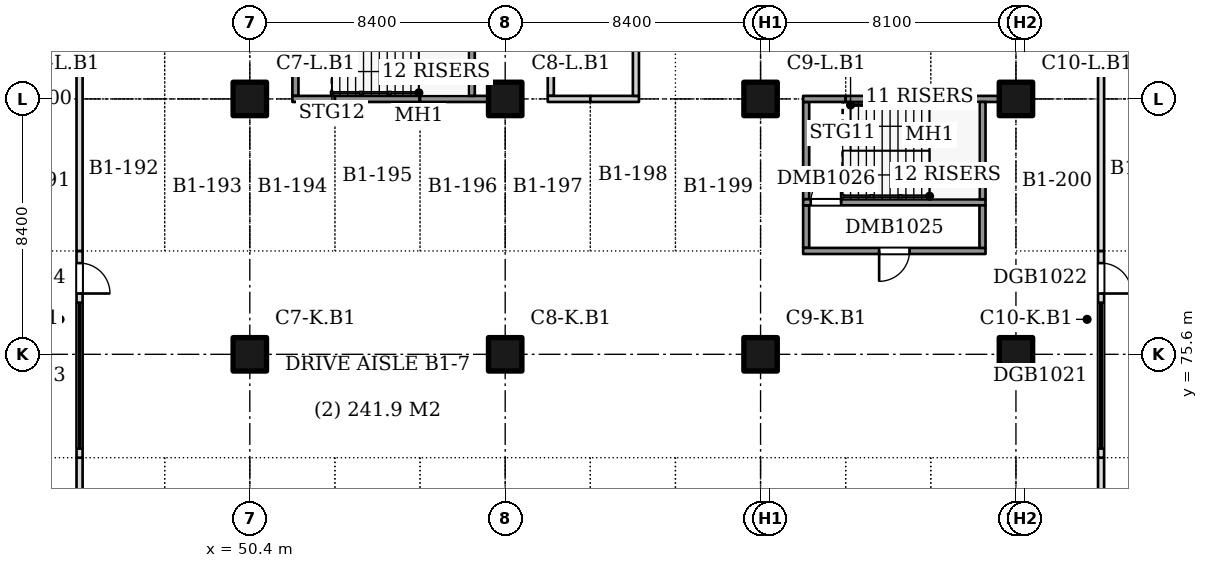
"""IFC4 building model, lengths in metres.
Left out: names, types, materials, properties, quantities, classifications, styles, units other than length and angle.
Written with IfcOpenShell. Run it as: python <this file> out.ifc"""

import sys

from ifc_helpers import new_model, si_unit, direction, frame, frame_2d, origin, origin_2d, place, context, subcontext, project, spatial, rectangle, extrude, element, fill, save


model = new_model("IFC4")
c1 = context("Model", 3, precision=1e-05, world=origin(), true_north=direction((0.0, 1.0)))
c2 = subcontext(c1, "Body", "Model", "MODEL_VIEW")
j1 = project(units=[si_unit("LENGTHUNIT", "METRE"), si_unit("PLANEANGLEUNIT", "RADIAN")], contexts=[c1])
p1 = place(None, origin())
s1 = spatial("IfcSite", under=j1, at=p1, CompositionType="ELEMENT")
p2 = place(p1, origin())
s2 = spatial("IfcBuilding", under=s1, at=p2, CompositionType="ELEMENT")
p3 = place(p2, frame((0.0, 0.0, -4.0)))
s3 = spatial("IfcBuildingStorey", under=s2, at=p3, CompositionType="ELEMENT", Elevation=-4.0)
for number, where, z_axis, x_axis in (
    (1, (50.4, 75.6, 0.0), (0.0, 0.0, 1.0), (1.0, 0.0, 0.0)),
    (2, (50.4, 84.0, 0.0), (0.0, 0.0, 1.0), (1.0, 0.0, 0.0)),
    (3, (58.8, 75.6, 0.0), (0.0, 0.0, 1.0), (1.0, 0.0, 0.0)),
    (4, (58.8, 84.0, 0.0), (0.0, 0.0, 1.0), (1.0, 0.0, 0.0)),
    (5, (67.2, 75.6, 0.0), (0.0, 0.0, 1.0), (1.0, 0.0, 0.0)),
    (6, (67.2, 84.0, 0.0), (0.0, 0.0, 1.0), (1.0, 0.0, 0.0)),
    (7, (75.6, 75.6, 0.0), (0.0, 0.0, 1.0), (1.0, 0.0, 0.0)),
    (8, (75.6, 84.0, 0.0), (0.0, 0.0, 1.0), (1.0, 0.0, 0.0)),
):
    element("IfcColumn", number, at=place(p3, frame(where, z_axis=z_axis, x_axis=x_axis)), inside=s3, PredefinedType="COLUMN", context=c2, shape_type="SweptSolid", body=[
        extrude(rectangle(XDim=1.1, YDim=1.1, at=origin_2d()), origin(), (0.0, 0.0, 1.0), 3.6),
    ])
p4 = place(p3, frame((51.9, 84.1, 0.0), z_axis=(0.0, 0.0, 1.0), x_axis=(0.0, 1.0, 0.0)))
e9 = element("IfcWall", 9, at=p4, inside=s3, PredefinedType="SOLIDWALL", context=c2, shape_type="SweptSolid", body=[
    extrude(rectangle(XDim=3.2, YDim=0.2, at=frame_2d((1.6, 0.0))), origin(), (0.0, 0.0, 1.0), 4.0),
])
p5 = place(p3, frame((51.8, 84.0, 0.0), z_axis=(0.0, 0.0, 1.0), x_axis=(1.0, 0.0, 0.0)))
e10 = element("IfcWall", 10, at=p5, inside=s3, PredefinedType="SOLIDWALL", context=c2, shape_type="SweptSolid", body=[
    extrude(rectangle(XDim=1.4, YDim=0.2, at=frame_2d((0.7, 0.0))), origin(), (0.0, 0.0, 1.0), 4.0),
])
p6 = place(p3, frame((53.2, 84.0, 0.0), z_axis=(0.0, 0.0, 1.0), x_axis=(1.0, 0.0, 0.0)))
e11 = element("IfcWall", 11, at=p6, inside=s3, PredefinedType="SOLIDWALL", context=c2, shape_type="SweptSolid", body=[
    extrude(rectangle(XDim=2.8, YDim=0.2, at=frame_2d((1.4, 0.0))), origin(), (0.0, 0.0, 1.0), 4.0),
])
p7 = place(p3, frame((56.0, 84.0, 0.0), z_axis=(0.0, 0.0, 1.0), x_axis=(1.0, 0.0, 0.0)))
e12 = element("IfcWall", 12, at=p7, inside=s3, PredefinedType="SOLIDWALL", context=c2, shape_type="SweptSolid", body=[
    extrude(rectangle(XDim=2.25, YDim=0.2, at=frame_2d((1.125, 0.0))), origin(), (0.0, 0.0, 1.0), 4.0),
])
p8 = place(p3, frame((57.7, 84.1, 0.0), z_axis=(0.0, 0.0, 1.0), x_axis=(0.0, 1.0, 0.0)))
e13 = element("IfcWall", 13, at=p8, inside=s3, PredefinedType="SOLIDWALL", context=c2, shape_type="SweptSolid", body=[
    extrude(rectangle(XDim=3.2, YDim=0.2, at=frame_2d((1.6, 0.0))), origin(), (0.0, 0.0, 1.0), 4.0),
])
p9 = place(p3, frame((60.3, 84.1, 0.0), z_axis=(0.0, 0.0, 1.0), x_axis=(0.0, 1.0, 0.0)))
e14 = element("IfcWall", 14, at=p9, inside=s3, PredefinedType="PARTITIONING", context=c2, shape_type="SweptSolid", body=[
    extrude(rectangle(XDim=4.8, YDim=0.2, at=frame_2d((2.4, 0.0))), origin(), (0.0, 0.0, 1.0), 3.6),
])
p10 = place(p9, frame((1.9, 0.0, 0.0)))
e15 = element("IfcOpeningElement", 15, at=p10, cuts=e14, PredefinedType="OPENING", context=c2, shape_type="SweptSolid", body=[
    extrude(rectangle(XDim=1.0, YDim=2.1, at=frame_2d((0.5, 1.05))), frame((0.0, 0.11, 0.0), z_axis=(0.0, -1.0, 0.0), x_axis=(1.0, 0.0, 0.0)), (0.0, 0.0, 1.0), 0.22),
])
p11 = place(p3, frame((60.2, 84.0, 0.0), z_axis=(0.0, 0.0, 1.0), x_axis=(1.0, 0.0, 0.0)))
e16 = element("IfcWall", 16, at=p11, inside=s3, PredefinedType="PARTITIONING", context=c2, shape_type="SweptSolid", body=[
    extrude(rectangle(XDim=1.4, YDim=0.2, at=frame_2d((0.7, 0.0))), origin(), (0.0, 0.0, 1.0), 3.6),
])
p12 = place(p3, frame((61.6, 84.0, 0.0), z_axis=(0.0, 0.0, 1.0), x_axis=(1.0, 0.0, 0.0)))
e17 = element("IfcWall", 17, at=p12, inside=s3, PredefinedType="PARTITIONING", context=c2, shape_type="SweptSolid", body=[
    extrude(rectangle(XDim=1.6, YDim=0.2, at=frame_2d((0.8, 0.0))), origin(), (0.0, 0.0, 1.0), 3.6),
])
p13 = place(p3, frame((63.1, 84.1, 0.0), z_axis=(0.0, 0.0, 1.0), x_axis=(0.0, 1.0, 0.0)))
e18 = element("IfcWall", 18, at=p13, inside=s3, PredefinedType="PARTITIONING", context=c2, shape_type="SweptSolid", body=[
    extrude(rectangle(XDim=4.8, YDim=0.2, at=frame_2d((2.4, 0.0))), origin(), (0.0, 0.0, 1.0), 3.6),
])
p14 = place(p3, frame((68.7, 79.1, 0.0), z_axis=(0.0, 0.0, 1.0), x_axis=(0.0, 1.0, 0.0)))
e19 = element("IfcWall", 19, at=p14, inside=s3, PredefinedType="SOLIDWALL", context=c2, shape_type="SweptSolid", body=[
    extrude(rectangle(XDim=1.4, YDim=0.2, at=frame_2d((0.7, 0.0))), origin(), (0.0, 0.0, 1.0), 4.0),
])
p15 = place(p3, frame((68.6, 79.0, 0.0), z_axis=(0.0, 0.0, 1.0), x_axis=(1.0, 0.0, 0.0)))
e20 = element("IfcWall", 20, at=p15, inside=s3, PredefinedType="SOLIDWALL", context=c2, shape_type="SweptSolid", body=[
    extrude(rectangle(XDim=6.0, YDim=0.2, at=frame_2d((3.0, 0.0))), origin(), (0.0, 0.0, 1.0), 4.0),
])
p16 = place(p15, frame((2.5, 0.0, 0.0)))
e21 = element("IfcOpeningElement", 21, at=p16, cuts=e20, PredefinedType="OPENING", context=c2, shape_type="SweptSolid", body=[
    extrude(rectangle(XDim=1.0, YDim=2.1, at=frame_2d((0.5, 1.05))), frame((0.0, 0.11, 0.0), z_axis=(0.0, -1.0, 0.0), x_axis=(1.0, 0.0, 0.0)), (0.0, 0.0, 1.0), 0.22),
])
p17 = place(p3, frame((68.7, 80.7, 0.0), z_axis=(0.0, 0.0, 1.0), x_axis=(0.0, 1.0, 0.0)))
e22 = element("IfcWall", 22, at=p17, inside=s3, PredefinedType="SOLIDWALL", context=c2, shape_type="SweptSolid", body=[
    extrude(rectangle(XDim=3.2, YDim=0.2, at=frame_2d((1.6, 0.0))), origin(), (0.0, 0.0, 1.0), 4.0),
])
p18 = place(p3, frame((68.6, 80.6, 0.0), z_axis=(0.0, 0.0, 1.0), x_axis=(1.0, 0.0, 0.0)))
e23 = element("IfcWall", 23, at=p18, inside=s3, PredefinedType="SOLIDWALL", context=c2, shape_type="SweptSolid", body=[
    extrude(rectangle(XDim=6.0, YDim=0.2, at=frame_2d((3.0, 0.0))), origin(), (0.0, 0.0, 1.0), 4.0),
])
p19 = place(p18, frame((0.25, 0.0, 0.0)))
e24 = element("IfcOpeningElement", 24, at=p19, cuts=e23, PredefinedType="OPENING", context=c2, shape_type="SweptSolid", body=[
    extrude(rectangle(XDim=1.0, YDim=2.1, at=frame_2d((0.5, 1.05))), frame((0.0, 0.11, 0.0), z_axis=(0.0, -1.0, 0.0), x_axis=(1.0, 0.0, 0.0)), (0.0, 0.0, 1.0), 0.22),
])
p20 = place(p3, frame((68.6, 84.0, 0.0), z_axis=(0.0, 0.0, 1.0), x_axis=(1.0, 0.0, 0.0)))
e25 = element("IfcWall", 25, at=p20, inside=s3, PredefinedType="SOLIDWALL", context=c2, shape_type="SweptSolid", body=[
    extrude(rectangle(XDim=1.4, YDim=0.2, at=frame_2d((0.7, 0.0))), origin(), (0.0, 0.0, 1.0), 4.0),
])
p21 = place(p3, frame((70.0, 84.0, 0.0), z_axis=(0.0, 0.0, 1.0), x_axis=(1.0, 0.0, 0.0)))
e26 = element("IfcWall", 26, at=p21, inside=s3, PredefinedType="SOLIDWALL", context=c2, shape_type="SweptSolid", body=[
    extrude(rectangle(XDim=2.8, YDim=0.2, at=frame_2d((1.4, 0.0))), origin(), (0.0, 0.0, 1.0), 4.0),
])
p22 = place(p3, frame((72.8, 84.0, 0.0), z_axis=(0.0, 0.0, 1.0), x_axis=(1.0, 0.0, 0.0)))
e27 = element("IfcWall", 27, at=p22, inside=s3, PredefinedType="SOLIDWALL", context=c2, shape_type="SweptSolid", body=[
    extrude(rectangle(XDim=2.25, YDim=0.2, at=frame_2d((1.125, 0.0))), origin(), (0.0, 0.0, 1.0), 4.0),
])
p23 = place(p3, frame((74.5, 79.1, 0.0), z_axis=(0.0, 0.0, 1.0), x_axis=(0.0, 1.0, 0.0)))
e28 = element("IfcWall", 28, at=p23, inside=s3, PredefinedType="SOLIDWALL", context=c2, shape_type="SweptSolid", body=[
    extrude(rectangle(XDim=1.4, YDim=0.2, at=frame_2d((0.7, 0.0))), origin(), (0.0, 0.0, 1.0), 4.0),
])
p24 = place(p3, frame((74.5, 80.7, 0.0), z_axis=(0.0, 0.0, 1.0), x_axis=(0.0, 1.0, 0.0)))
e29 = element("IfcWall", 29, at=p24, inside=s3, PredefinedType="SOLIDWALL", context=c2, shape_type="SweptSolid", body=[
    extrude(rectangle(XDim=3.2, YDim=0.2, at=frame_2d((1.6, 0.0))), origin(), (0.0, 0.0, 1.0), 4.0),
])
p25 = place(p3, frame((44.8, 62.2, 0.0), z_axis=(0.0, 0.0, 1.0), x_axis=(0.0, 1.0, 0.0)))
e30 = element("IfcWall", 30, at=p25, inside=s3, PredefinedType="PARTITIONING", context=c2, shape_type="SweptSolid", body=[
    extrude(rectangle(XDim=10.0, YDim=0.2, at=frame_2d((5.0, 0.0))), origin(), (0.0, 0.0, 1.0), 3.6),
])
p26 = place(p3, frame((44.8, 72.2, 0.0), z_axis=(0.0, 0.0, 1.0), x_axis=(0.0, 1.0, 0.0)))
e31 = element("IfcWall", 31, at=p26, inside=s3, PredefinedType="PARTITIONING", context=c2, shape_type="SweptSolid", body=[
    extrude(rectangle(XDim=6.8, YDim=0.2, at=frame_2d((3.4, 0.0))), origin(), (0.0, 0.0, 1.0), 3.6),
])
p27 = place(p26, frame((0.3, 0.0, 0.0)))
e32 = element("IfcOpeningElement", 32, at=p27, cuts=e31, PredefinedType="OPENING", context=c2, shape_type="SweptSolid", body=[
    extrude(rectangle(XDim=4.8, YDim=2.4, at=frame_2d((2.4, 1.2))), frame((0.0, 0.11, 0.0), z_axis=(0.0, -1.0, 0.0), x_axis=(1.0, 0.0, 0.0)), (0.0, 0.0, 1.0), 0.22),
])
p28 = place(p26, frame((5.4, 0.0, 0.0)))
e33 = element("IfcOpeningElement", 33, at=p28, cuts=e31, PredefinedType="OPENING", context=c2, shape_type="SweptSolid", body=[
    extrude(rectangle(XDim=1.0, YDim=2.1, at=frame_2d((0.5, 1.05))), frame((0.0, 0.11, 0.0), z_axis=(0.0, -1.0, 0.0), x_axis=(1.0, 0.0, 0.0)), (0.0, 0.0, 1.0), 0.22),
])
for number, where, z_axis, x_axis in (
    (34, (44.8, 79.0, 0.0), (0.0, 0.0, 1.0), (0.0, 1.0, 0.0)),
    (35, (78.4, 62.2, 0.0), (0.0, 0.0, 1.0), (0.0, 1.0, 0.0)),
):
    element("IfcWall", number, at=place(p3, frame(where, z_axis=z_axis, x_axis=x_axis)), inside=s3, PredefinedType="PARTITIONING", context=c2, shape_type="SweptSolid", body=[
        extrude(rectangle(XDim=10.0, YDim=0.2, at=frame_2d((5.0, 0.0))), origin(), (0.0, 0.0, 1.0), 3.6),
    ])
p29 = place(p3, frame((78.4, 72.2, 0.0), z_axis=(0.0, 0.0, 1.0), x_axis=(0.0, 1.0, 0.0)))
e36 = element("IfcWall", 36, at=p29, inside=s3, PredefinedType="PARTITIONING", context=c2, shape_type="SweptSolid", body=[
    extrude(rectangle(XDim=6.8, YDim=0.2, at=frame_2d((3.4, 0.0))), origin(), (0.0, 0.0, 1.0), 3.6),
])
p30 = place(p29, frame((0.3, 0.0, 0.0)))
e37 = element("IfcOpeningElement", 37, at=p30, cuts=e36, PredefinedType="OPENING", context=c2, shape_type="SweptSolid", body=[
    extrude(rectangle(XDim=4.8, YDim=2.4, at=frame_2d((2.4, 1.2))), frame((0.0, 0.11, 0.0), z_axis=(0.0, -1.0, 0.0), x_axis=(1.0, 0.0, 0.0)), (0.0, 0.0, 1.0), 0.22),
])
p31 = place(p29, frame((5.4, 0.0, 0.0)))
e38 = element("IfcOpeningElement", 38, at=p31, cuts=e36, PredefinedType="OPENING", context=c2, shape_type="SweptSolid", body=[
    extrude(rectangle(XDim=1.0, YDim=2.1, at=frame_2d((0.5, 1.05))), frame((0.0, 0.11, 0.0), z_axis=(0.0, -1.0, 0.0), x_axis=(1.0, 0.0, 0.0)), (0.0, 0.0, 1.0), 0.22),
])
p32 = place(p3, frame((78.4, 79.0, 0.0), z_axis=(0.0, 0.0, 1.0), x_axis=(0.0, 1.0, 0.0)))
e39 = element("IfcWall", 39, at=p32, inside=s3, PredefinedType="PARTITIONING", context=c2, shape_type="SweptSolid", body=[
    extrude(rectangle(XDim=10.0, YDim=0.2, at=frame_2d((5.0, 0.0))), origin(), (0.0, 0.0, 1.0), 3.6),
])
p33 = place(p16, frame((1.0, 0.0, 0.0), z_axis=(0.0, 0.0, 1.0), x_axis=(-1.0, 0.0, 0.0)))
e40 = element("IfcDoor", 40, at=p33, inside=s3, OperationType="SINGLE_SWING_RIGHT", PredefinedType="DOOR", context=c2, shape_type="SweptSolid", body=[
    extrude(rectangle(XDim=1.0, YDim=2.1, at=frame_2d((0.5, 1.05))), frame((0.0, 0.025, 0.0), z_axis=(0.0, -1.0, 0.0), x_axis=(1.0, 0.0, 0.0)), (0.0, 0.0, 1.0), 0.05),
])
fill(e21, e40)
p34 = place(p19, origin())
e41 = element("IfcDoor", 41, at=p34, inside=s3, OperationType="SINGLE_SWING_RIGHT", PredefinedType="DOOR", context=c2, shape_type="SweptSolid", body=[
    extrude(rectangle(XDim=1.0, YDim=2.1, at=frame_2d((0.5, 1.05))), frame((0.0, 0.025, 0.0), z_axis=(0.0, -1.0, 0.0), x_axis=(1.0, 0.0, 0.0)), (0.0, 0.0, 1.0), 0.05),
])
fill(e24, e41)
p35 = place(p27, origin())
e42 = element("IfcDoor", 42, at=p35, inside=s3, OperationType="ROLLINGUP", PredefinedType="GATE", context=c2, shape_type="SweptSolid", body=[
    extrude(rectangle(XDim=4.8, YDim=2.4, at=frame_2d((2.4, 1.2))), frame((0.0, 0.025, 0.0), z_axis=(0.0, -1.0, 0.0), x_axis=(1.0, 0.0, 0.0)), (0.0, 0.0, 1.0), 0.05),
])
fill(e32, e42)
p36 = place(p28, frame((1.0, 0.0, 0.0), z_axis=(0.0, 0.0, 1.0), x_axis=(-1.0, 0.0, 0.0)))
e43 = element("IfcDoor", 43, at=p36, inside=s3, OperationType="SINGLE_SWING_RIGHT", PredefinedType="DOOR", context=c2, shape_type="SweptSolid", body=[
    extrude(rectangle(XDim=1.0, YDim=2.1, at=frame_2d((0.5, 1.05))), frame((0.0, 0.025, 0.0), z_axis=(0.0, -1.0, 0.0), x_axis=(1.0, 0.0, 0.0)), (0.0, 0.0, 1.0), 0.05),
])
fill(e33, e43)
p37 = place(p30, origin())
e44 = element("IfcDoor", 44, at=p37, inside=s3, OperationType="ROLLINGUP", PredefinedType="GATE", context=c2, shape_type="SweptSolid", body=[
    extrude(rectangle(XDim=4.8, YDim=2.4, at=frame_2d((2.4, 1.2))), frame((0.0, 0.025, 0.0), z_axis=(0.0, -1.0, 0.0), x_axis=(1.0, 0.0, 0.0)), (0.0, 0.0, 1.0), 0.05),
])
fill(e37, e44)
p38 = place(p31, frame((1.0, 0.0, 0.0), z_axis=(0.0, 0.0, 1.0), x_axis=(-1.0, 0.0, 0.0)))
e45 = element("IfcDoor", 45, at=p38, inside=s3, OperationType="SINGLE_SWING_RIGHT", PredefinedType="DOOR", context=c2, shape_type="SweptSolid", body=[
    extrude(rectangle(XDim=1.0, YDim=2.1, at=frame_2d((0.5, 1.05))), frame((0.0, 0.025, 0.0), z_axis=(0.0, -1.0, 0.0), x_axis=(1.0, 0.0, 0.0)), (0.0, 0.0, 1.0), 0.05),
])
fill(e38, e45)
save(model, sys.argv[1])
